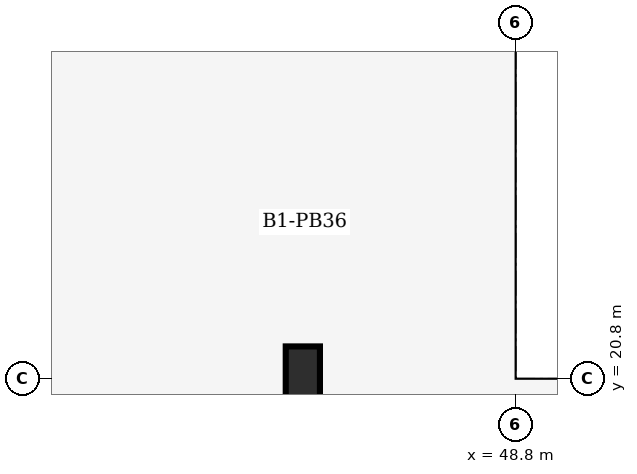
"""IFC4 building model, lengths in metres.
Left out: names, types, materials, properties, quantities, classifications, styles, units other than length and angle.
Written with IfcOpenShell. Run it as: python <this file> out.ifc"""

import sys

from ifc_helpers import new_model, si_unit, direction, frame, origin, origin_2d, place, context, subcontext, project, spatial, rectangle, extrude, element, save


model = new_model("IFC4")
c1 = context("Model", 3, precision=1e-05, world=origin(), true_north=direction((0.0, 1.0)))
c2 = subcontext(c1, "Body", "Model", "MODEL_VIEW")
j1 = project(units=[si_unit("LENGTHUNIT", "METRE"), si_unit("PLANEANGLEUNIT", "RADIAN")], contexts=[c1])
p1 = place(None, origin())
s1 = spatial("IfcSite", under=j1, at=p1, CompositionType="ELEMENT")
p2 = place(p1, origin())
s2 = spatial("IfcBuilding", under=s1, at=p2, CompositionType="ELEMENT")
p3 = place(p2, frame((0.0, 0.0, -4.8)))
s3 = spatial("IfcBuildingStorey", under=s2, at=p3, CompositionType="ELEMENT", Elevation=-4.8)
p4 = place(p3, frame((46.0, 20.8, 0.0), z_axis=(0.0, 0.0, 1.0), x_axis=(1.0, 0.0, 0.0)))
e1 = element("IfcColumn", 1, at=p4, inside=s3, PredefinedType="PILASTER", context=c2, shape_type="SweptSolid", body=[
    extrude(rectangle(XDim=0.45, YDim=0.85, at=origin_2d()), origin(), (0.0, 0.0, 1.0), 4.8),
])
save(model, sys.argv[1])
